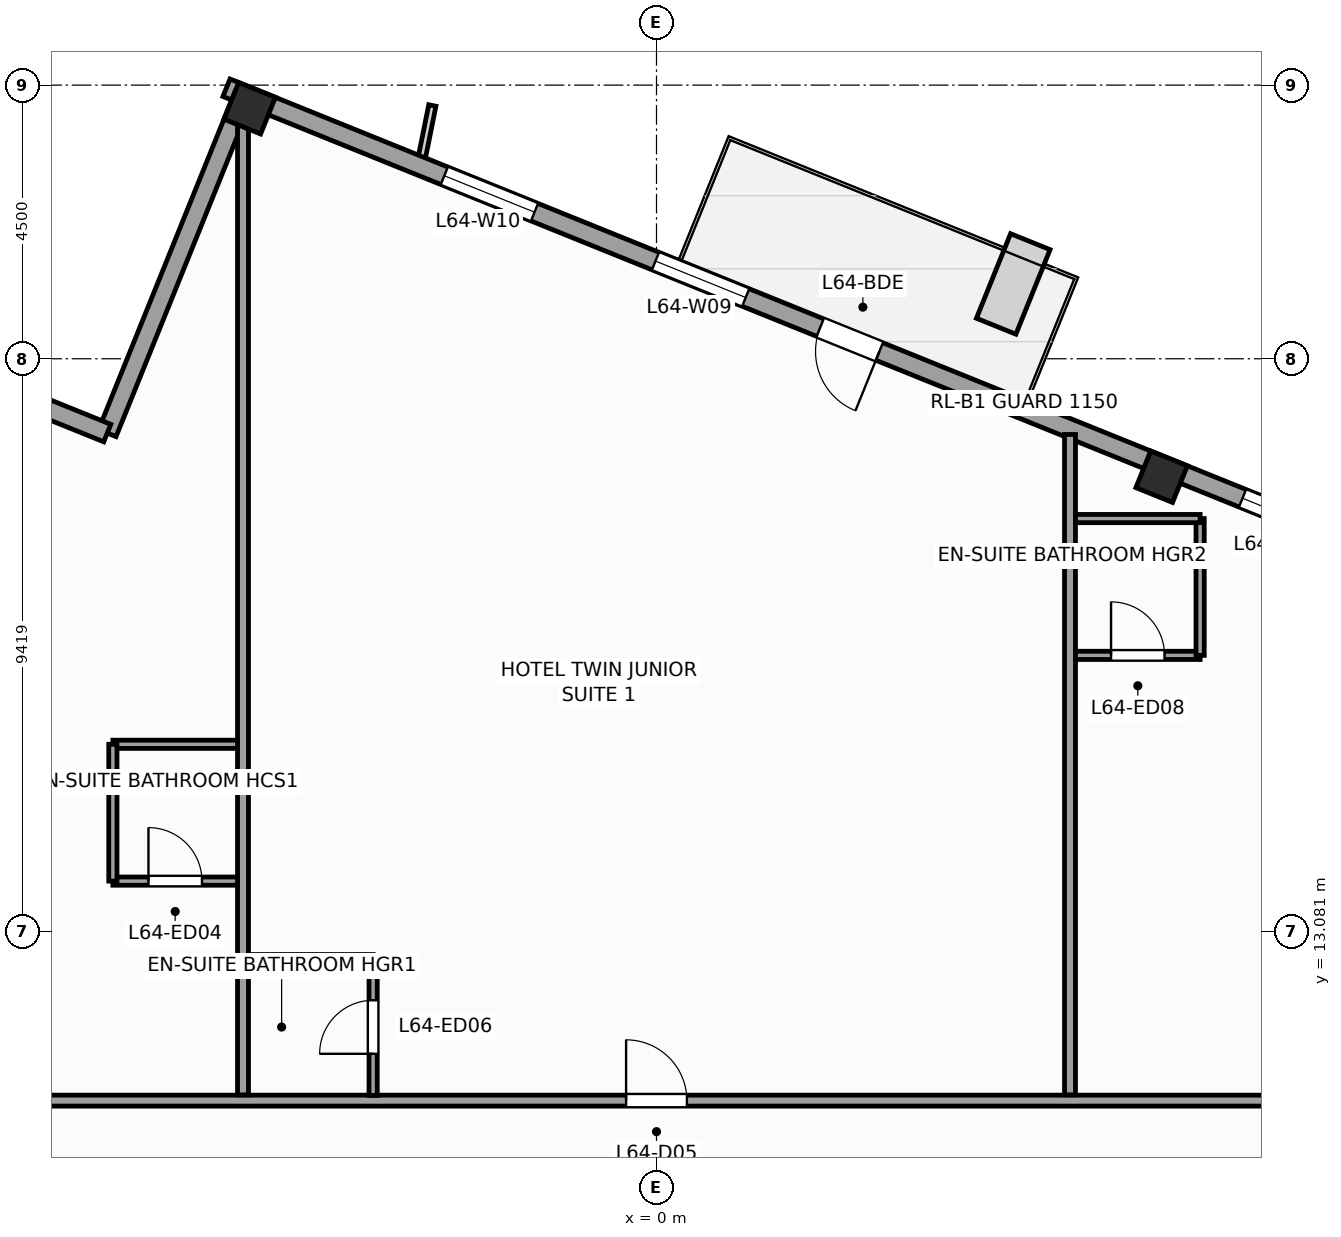
"""IFC4 building model, lengths in metres.
Left out: names, types, materials, properties, quantities, classifications, styles, units other than length and angle.
Written with IfcOpenShell. Run it as: python <this file> out.ifc"""

import sys

from ifc_helpers import new_model, si_unit, direction, frame, frame_2d, origin, origin_2d, place, context, subcontext, project, spatial, rectangle, extrude, source, transform, mapped, element, fill, save


model = new_model("IFC4")
c1 = context("Model", 3, precision=1e-05, world=origin(), true_north=direction((0.0, 1.0)))
c2 = subcontext(c1, "Body", "Model", "MODEL_VIEW")
j1 = project(units=[si_unit("LENGTHUNIT", "METRE"), si_unit("PLANEANGLEUNIT", "RADIAN")], contexts=[c1])
p1 = place(None, origin())
s1 = spatial("IfcSite", under=j1, at=p1, CompositionType="ELEMENT")
p2 = place(p1, origin())
s2 = spatial("IfcBuilding", under=s1, at=p2, CompositionType="ELEMENT")
p3 = place(p2, frame((0.0, 0.0, 265.2)))
s3 = spatial("IfcBuildingStorey", under=s2, at=p3, CompositionType="ELEMENT", Elevation=265.2)
m1 = source(origin(), c2, "Body", "SweptSolid", [
    extrude(rectangle(XDim=0.65, YDim=0.65, at=origin_2d()), origin(), (0.0, 0.0, 1.0), 3.6),
])
for number, where, z_axis, x_axis in (
    (1, (8.307, 20.56, 0.0), (0.0, 0.0, 1.0), (0.375, 0.927, 0.0)),
    (2, (-6.69, 26.62, 0.0), (0.0, 0.0, 1.0), (0.375, 0.927, 0.0)),
):
    element("IfcColumn", number, at=place(p3, frame(where, z_axis=z_axis, x_axis=x_axis)), inside=s3, PredefinedType="COLUMN", context=c2, shape_type="MappedRepresentation", body=[
        mapped(m1, transform((0.0, 0.0, 0.0), scale=1.0)),
    ])
p4 = place(p3, frame((23.813, 14.479, 0.0), z_axis=(0.0, 0.0, 1.0), x_axis=(-0.927182657188, 0.374609557019, 0.0)))
e3 = element("IfcWall", 3, at=p4, inside=s3, PredefinedType="STANDARD", context=c2, shape_type="SweptSolid", body=[
    extrude(rectangle(XDim=33.31, YDim=0.31, at=frame_2d((16.655, 0.0))), origin(), (0.0, 0.0, 1.0), 2.75),
])
p5 = place(p4, frame((21.73, 0.0, 0.0)))
e4 = element("IfcOpeningElement", 4, at=p5, cuts=e3, PredefinedType="OPENING", context=c2, shape_type="SweptSolid", body=[
    extrude(rectangle(XDim=1.05, YDim=2.25, at=frame_2d((0.525, 1.125))), frame((0.0, 0.165, 0.0), z_axis=(0.0, -1.0, 0.0), x_axis=(1.0, 0.0, 0.0)), (0.0, 0.0, 1.0), 0.33),
])
p6 = place(p4, frame((3.197, 0.0, 0.47)))
e5 = element("IfcOpeningElement", 5, at=p6, cuts=e3, PredefinedType="OPENING", context=c2, shape_type="SweptSolid", body=[
    extrude(rectangle(XDim=1.6, YDim=2.1, at=frame_2d((0.8, 1.05))), frame((0.0, 0.165, 0.0), z_axis=(0.0, -1.0, 0.0), x_axis=(1.0, 0.0, 0.0)), (0.0, 0.0, 1.0), 0.33),
])
p7 = place(p4, frame((8.86, 0.0, 0.47)))
e6 = element("IfcOpeningElement", 6, at=p7, cuts=e3, PredefinedType="OPENING", context=c2, shape_type="SweptSolid", body=[
    extrude(rectangle(XDim=1.6, YDim=2.1, at=frame_2d((0.8, 1.05))), frame((0.0, 0.165, 0.0), z_axis=(0.0, -1.0, 0.0), x_axis=(1.0, 0.0, 0.0)), (0.0, 0.0, 1.0), 0.33),
])
p8 = place(p4, frame((13.689, 0.0, 0.47)))
e7 = element("IfcOpeningElement", 7, at=p8, cuts=e3, PredefinedType="OPENING", context=c2, shape_type="SweptSolid", body=[
    extrude(rectangle(XDim=1.6, YDim=2.1, at=frame_2d((0.8, 1.05))), frame((0.0, 0.165, 0.0), z_axis=(0.0, -1.0, 0.0), x_axis=(1.0, 0.0, 0.0)), (0.0, 0.0, 1.0), 0.33),
])
p9 = place(p4, frame((24.101, 0.0, 0.47)))
e8 = element("IfcOpeningElement", 8, at=p9, cuts=e3, PredefinedType="OPENING", context=c2, shape_type="SweptSolid", body=[
    extrude(rectangle(XDim=1.6, YDim=2.1, at=frame_2d((0.8, 1.05))), frame((0.0, 0.165, 0.0), z_axis=(0.0, -1.0, 0.0), x_axis=(1.0, 0.0, 0.0)), (0.0, 0.0, 1.0), 0.33),
])
p10 = place(p4, frame((27.847, 0.0, 0.47)))
e9 = element("IfcOpeningElement", 9, at=p10, cuts=e3, PredefinedType="OPENING", context=c2, shape_type="SweptSolid", body=[
    extrude(rectangle(XDim=1.6, YDim=2.1, at=frame_2d((0.8, 1.05))), frame((0.0, 0.165, 0.0), z_axis=(0.0, -1.0, 0.0), x_axis=(1.0, 0.0, 0.0)), (0.0, 0.0, 1.0), 0.33),
])
p11 = place(p3, frame((-6.784, 26.841, 0.0), z_axis=(0.0, 0.0, 1.0), x_axis=(-0.374636620962, -0.927171722085, 0.0)))
e10 = element("IfcWall", 10, at=p11, inside=s3, PredefinedType="STANDARD", context=c2, shape_type="SweptSolid", body=[
    extrude(rectangle(XDim=6.0, YDim=0.31, at=frame_2d((3.0, 0.0))), origin(), (0.0, 0.0, 1.0), 2.65),
])
p12 = place(p3, frame((-9.032, 21.278, 0.0), z_axis=(0.0, 0.0, 1.0), x_axis=(-0.927185411764, 0.374602739196, 0.0)))
e11 = element("IfcWall", 11, at=p12, inside=s3, PredefinedType="STANDARD", context=c2, shape_type="SweptSolid", body=[
    extrude(rectangle(XDim=6.155, YDim=0.31, at=frame_2d((3.078, 0.0))), origin(), (0.0, 0.0, 1.0), 3.35),
])
p13 = place(p12, frame((2.278, 0.0, 0.47)))
e12 = element("IfcOpeningElement", 12, at=p13, cuts=e11, PredefinedType="OPENING", context=c2, shape_type="SweptSolid", body=[
    extrude(rectangle(XDim=1.6, YDim=2.1, at=frame_2d((0.8, 1.05))), frame((0.0, 0.165, 0.0), z_axis=(0.0, -1.0, 0.0), x_axis=(1.0, 0.0, 0.0)), (0.0, 0.0, 1.0), 0.33),
])
p14 = place(p3, frame((-10.3, 10.3, 0.0), z_axis=(0.0, 0.0, 1.0), x_axis=(1.0, 0.0, 0.0)))
e13 = element("IfcWall", 13, at=p14, inside=s3, PredefinedType="PARTITIONING", context=c2, shape_type="SweptSolid", body=[
    extrude(rectangle(XDim=21.7, YDim=0.18, at=frame_2d((10.85, 0.0))), origin(), (0.0, 0.0, 1.0), 3.35),
])
p15 = place(p14, frame((9.8, 0.0, 0.0)))
e14 = element("IfcOpeningElement", 14, at=p15, cuts=e13, PredefinedType="OPENING", context=c2, shape_type="SweptSolid", body=[
    extrude(rectangle(XDim=1.0, YDim=2.15, at=frame_2d((0.5, 1.075))), frame((0.0, 0.1, 0.0), z_axis=(0.0, -1.0, 0.0), x_axis=(1.0, 0.0, 0.0)), (0.0, 0.0, 1.0), 0.2),
])
p16 = place(p3, frame((-6.8, 10.395, 0.0), z_axis=(0.0, 0.0, 1.0), x_axis=(0.0, 1.0, 0.0)))
e15 = element("IfcWall", 15, at=p16, inside=s3, PredefinedType="PARTITIONING", context=c2, shape_type="SweptSolid", body=[
    extrude(rectangle(XDim=16.167, YDim=0.18, at=frame_2d((8.083, 0.0))), origin(), (0.0, 0.0, 1.0), 3.35),
])
p17 = place(p3, frame((6.8, 10.395, 0.0), z_axis=(0.0, 0.0, 1.0), x_axis=(0.0, 1.0, 0.0)))
e16 = element("IfcWall", 16, at=p17, inside=s3, PredefinedType="PARTITIONING", context=c2, shape_type="SweptSolid", body=[
    extrude(rectangle(XDim=10.86, YDim=0.18, at=frame_2d((5.43, 0.0))), origin(), (0.0, 0.0, 1.0), 3.35),
])
p18 = place(p3, frame((-8.94, 13.91, 0.0), z_axis=(0.0, 0.0, 1.0), x_axis=(1.0, 0.0, 0.0)))
e17 = element("IfcWall", 17, at=p18, inside=s3, PredefinedType="PARTITIONING", context=c2, shape_type="SweptSolid", body=[
    extrude(rectangle(XDim=2.05, YDim=0.135, at=frame_2d((1.025, 0.0))), origin(), (0.0, 0.0, 1.0), 3.35),
])
p19 = place(p18, frame((0.585, 0.0, 0.0)))
e18 = element("IfcOpeningElement", 18, at=p19, cuts=e17, PredefinedType="OPENING", context=c2, shape_type="SweptSolid", body=[
    extrude(rectangle(XDim=0.88, YDim=2.1, at=frame_2d((0.44, 1.05))), frame((0.0, 0.078, 0.0), z_axis=(0.0, -1.0, 0.0), x_axis=(1.0, 0.0, 0.0)), (0.0, 0.0, 1.0), 0.155),
])
p20 = place(p3, frame((-8.94, 16.16, 0.0), z_axis=(0.0, 0.0, 1.0), x_axis=(1.0, 0.0, 0.0)))
e19 = element("IfcWall", 19, at=p20, inside=s3, PredefinedType="PARTITIONING", context=c2, shape_type="SweptSolid", body=[
    extrude(rectangle(XDim=2.05, YDim=0.135, at=frame_2d((1.025, 0.0))), origin(), (0.0, 0.0, 1.0), 3.35),
])
p21 = place(p3, frame((-8.94, 13.91, 0.0), z_axis=(0.0, 0.0, 1.0), x_axis=(0.0, 1.0, 0.0)))
e20 = element("IfcWall", 20, at=p21, inside=s3, PredefinedType="PARTITIONING", context=c2, shape_type="SweptSolid", body=[
    extrude(rectangle(XDim=2.25, YDim=0.135, at=frame_2d((1.125, 0.0))), origin(), (0.0, 0.0, 1.0), 3.35),
])
p22 = place(p3, frame((-4.66, 10.385, 0.0), z_axis=(0.0, 0.0, 1.0), x_axis=(0.0, 1.0, 0.0)))
e21 = element("IfcWall", 21, at=p22, inside=s3, PredefinedType="PARTITIONING", context=c2, shape_type="SweptSolid", body=[
    extrude(rectangle(XDim=2.25, YDim=0.135, at=frame_2d((1.125, 0.0))), origin(), (0.0, 0.0, 1.0), 3.35),
])
p23 = place(p22, frame((0.685, 0.0, 0.0)))
e22 = element("IfcOpeningElement", 22, at=p23, cuts=e21, PredefinedType="OPENING", context=c2, shape_type="SweptSolid", body=[
    extrude(rectangle(XDim=0.88, YDim=2.1, at=frame_2d((0.44, 1.05))), frame((0.0, 0.078, 0.0), z_axis=(0.0, -1.0, 0.0), x_axis=(1.0, 0.0, 0.0)), (0.0, 0.0, 1.0), 0.155),
])
p24 = place(p3, frame((-6.71, 12.635, 0.0), z_axis=(0.0, 0.0, 1.0), x_axis=(1.0, 0.0, 0.0)))
e23 = element("IfcWall", 23, at=p24, inside=s3, PredefinedType="PARTITIONING", context=c2, shape_type="SweptSolid", body=[
    extrude(rectangle(XDim=2.05, YDim=0.135, at=frame_2d((1.025, 0.0))), origin(), (0.0, 0.0, 1.0), 3.35),
])
p25 = place(p3, frame((6.89, 17.622, 0.0), z_axis=(0.0, 0.0, 1.0), x_axis=(1.0, 0.0, 0.0)))
e24 = element("IfcWall", 24, at=p25, inside=s3, PredefinedType="PARTITIONING", context=c2, shape_type="SweptSolid", body=[
    extrude(rectangle(XDim=2.05, YDim=0.135, at=frame_2d((1.025, 0.0))), origin(), (0.0, 0.0, 1.0), 2.95),
])
p26 = place(p25, frame((0.585, 0.0, 0.0)))
e25 = element("IfcOpeningElement", 25, at=p26, cuts=e24, PredefinedType="OPENING", context=c2, shape_type="SweptSolid", body=[
    extrude(rectangle(XDim=0.88, YDim=2.1, at=frame_2d((0.44, 1.05))), frame((0.0, 0.078, 0.0), z_axis=(0.0, -1.0, 0.0), x_axis=(1.0, 0.0, 0.0)), (0.0, 0.0, 1.0), 0.155),
])
p27 = place(p3, frame((8.94, 17.622, 0.0), z_axis=(0.0, 0.0, 1.0), x_axis=(0.0, 1.0, 0.0)))
e26 = element("IfcWall", 26, at=p27, inside=s3, PredefinedType="PARTITIONING", context=c2, shape_type="SweptSolid", body=[
    extrude(rectangle(XDim=2.25, YDim=0.135, at=frame_2d((1.125, 0.0))), origin(), (0.0, 0.0, 1.0), 3.35),
])
p28 = place(p3, frame((6.89, 19.872, 0.0), z_axis=(0.0, 0.0, 1.0), x_axis=(1.0, 0.0, 0.0)))
e27 = element("IfcWall", 27, at=p28, inside=s3, PredefinedType="PARTITIONING", context=c2, shape_type="SweptSolid", body=[
    extrude(rectangle(XDim=2.05, YDim=0.135, at=frame_2d((1.025, 0.0))), origin(), (0.0, 0.0, 1.0), 3.35),
])
m2 = source(origin(), c2, "Body", "SweptSolid", [
    extrude(rectangle(XDim=1.05, YDim=2.25, at=frame_2d((0.525, 1.125))), frame((0.0, 0.025, 0.0), z_axis=(0.0, -1.0, 0.0), x_axis=(1.0, 0.0, 0.0)), (0.0, 0.0, 1.0), 0.05),
])
p29 = place(p5, origin())
e28 = element("IfcDoor", 28, at=p29, inside=s3, OperationType="SINGLE_SWING_LEFT", PredefinedType="DOOR", context=c2, shape_type="MappedRepresentation", body=[
    mapped(m2, transform((0.0, 0.0, 0.0), scale=1.0)),
])
fill(e4, e28)
m3 = source(origin(), c2, "Body", "SweptSolid", [
    extrude(rectangle(XDim=1.6, YDim=2.1, at=frame_2d((0.8, 1.05))), frame((0.0, 0.03, 0.0), z_axis=(0.0, -1.0, 0.0), x_axis=(1.0, 0.0, 0.0)), (0.0, 0.0, 1.0), 0.06),
])
p30 = place(p8, origin())
e29 = element("IfcWindow", 29, at=p30, inside=s3, PartitioningType="SINGLE_PANEL", PredefinedType="WINDOW", context=c2, shape_type="MappedRepresentation", body=[
    mapped(m3, transform((0.0, 0.0, 0.0), scale=1.0)),
])
fill(e7, e29)
p31 = place(p9, origin())
e30 = element("IfcWindow", 30, at=p31, inside=s3, PartitioningType="SINGLE_PANEL", PredefinedType="WINDOW", context=c2, shape_type="MappedRepresentation", body=[
    mapped(m3, transform((0.0, 0.0, 0.0), scale=1.0)),
])
fill(e8, e30)
p32 = place(p10, origin())
e31 = element("IfcWindow", 31, at=p32, inside=s3, PartitioningType="SINGLE_PANEL", PredefinedType="WINDOW", context=c2, shape_type="MappedRepresentation", body=[
    mapped(m3, transform((0.0, 0.0, 0.0), scale=1.0)),
])
fill(e9, e31)
m4 = source(origin(), c2, "Body", "SweptSolid", [
    extrude(rectangle(XDim=0.88, YDim=2.1, at=frame_2d((0.44, 1.05))), frame((0.0, 0.025, 0.0), z_axis=(0.0, -1.0, 0.0), x_axis=(1.0, 0.0, 0.0)), (0.0, 0.0, 1.0), 0.05),
])
p33 = place(p19, origin())
e32 = element("IfcDoor", 32, at=p33, inside=s3, OperationType="SINGLE_SWING_LEFT", PredefinedType="DOOR", context=c2, shape_type="MappedRepresentation", body=[
    mapped(m4, transform((0.0, 0.0, 0.0), scale=1.0)),
])
fill(e18, e32)
m5 = source(origin(), c2, "Body", "SweptSolid", [
    extrude(rectangle(XDim=1.0, YDim=2.15, at=frame_2d((0.5, 1.075))), frame((0.0, 0.025, 0.0), z_axis=(0.0, -1.0, 0.0), x_axis=(1.0, 0.0, 0.0)), (0.0, 0.0, 1.0), 0.05),
])
p34 = place(p15, origin())
e33 = element("IfcDoor", 33, at=p34, inside=s3, OperationType="SINGLE_SWING_LEFT", PredefinedType="DOOR", context=c2, shape_type="MappedRepresentation", body=[
    mapped(m5, transform((0.0, 0.0, 0.0), scale=1.0)),
])
fill(e14, e33)
p35 = place(p23, origin())
e34 = element("IfcDoor", 34, at=p35, inside=s3, OperationType="SINGLE_SWING_LEFT", PredefinedType="DOOR", context=c2, shape_type="MappedRepresentation", body=[
    mapped(m4, transform((0.0, 0.0, 0.0), scale=1.0)),
])
fill(e22, e34)
p36 = place(p26, origin())
e35 = element("IfcDoor", 35, at=p36, inside=s3, OperationType="SINGLE_SWING_LEFT", PredefinedType="DOOR", context=c2, shape_type="MappedRepresentation", body=[
    mapped(m4, transform((0.0, 0.0, 0.0), scale=1.0)),
])
fill(e25, e35)
save(model, sys.argv[1])
